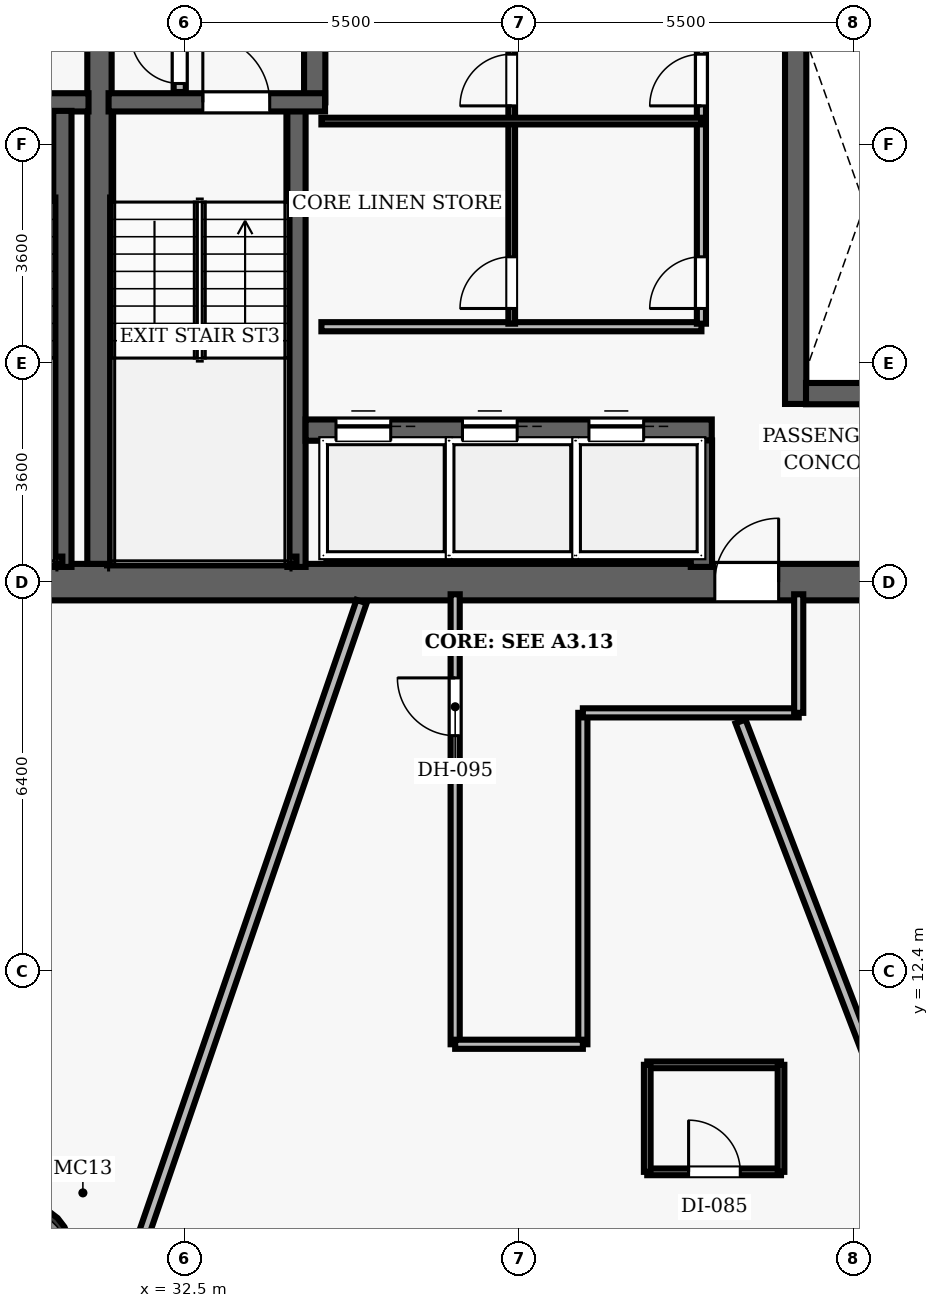
"""IFC4 building model, lengths in metres.
Left out: names, types, materials, properties, quantities, classifications, styles, units other than length and angle.
Written with IfcOpenShell. Run it as: python <this file> out.ifc"""

import sys

from ifc_helpers import new_model, si_unit, direction, frame, frame_2d, origin, origin_2d, place, context, subcontext, project, spatial, rectangle, hollow_circle, extrude, element, fill, save


model = new_model("IFC4")
c1 = context("Model", 3, precision=1e-05, world=origin(), true_north=direction((0.0, 1.0)))
c2 = subcontext(c1, "Body", "Model", "MODEL_VIEW")
j1 = project(units=[si_unit("LENGTHUNIT", "METRE"), si_unit("PLANEANGLEUNIT", "RADIAN")], contexts=[c1])
p1 = place(None, origin())
s1 = spatial("IfcSite", under=j1, at=p1, CompositionType="ELEMENT")
p2 = place(p1, origin())
s2 = spatial("IfcBuilding", under=s1, at=p2, CompositionType="ELEMENT")
p3 = place(p2, frame((0.0, 0.0, 109.8)))
s3 = spatial("IfcBuildingStorey", under=s2, at=p3, CompositionType="ELEMENT", Elevation=109.8)
p4 = place(p3, frame((26.7, 18.8, 0.0), z_axis=(0.0, 0.0, 1.0), x_axis=(1.0, 0.0, 0.0)))
e1 = element("IfcWall", 1, at=p4, inside=s3, PredefinedType="SHEAR", context=c2, shape_type="SweptSolid", body=[
    extrude(rectangle(XDim=22.6, YDim=0.6, at=frame_2d((11.3, 0.0))), origin(), (0.0, 0.0, 1.0), 3.5),
])
p5 = place(p4, frame((14.52, 0.0, 0.0)))
e2 = element("IfcOpeningElement", 2, at=p5, cuts=e1, PredefinedType="OPENING", context=c2, shape_type="SweptSolid", body=[
    extrude(rectangle(XDim=1.05, YDim=2.15, at=frame_2d((0.525, 1.075))), frame((0.0, 0.31, 0.0), z_axis=(0.0, -1.0, 0.0), x_axis=(1.0, 0.0, 0.0)), (0.0, 0.0, 1.0), 0.62),
])
p6 = place(p3, frame((31.1, 19.1, 0.0), z_axis=(0.0, 0.0, 1.0), x_axis=(0.0, 1.0, 0.0)))
e3 = element("IfcWall", 3, at=p6, inside=s3, PredefinedType="SHEAR", context=c2, shape_type="SweptSolid", body=[
    extrude(rectangle(XDim=13.8, YDim=0.4, at=frame_2d((6.9, 0.0))), origin(), (0.0, 0.0, 1.0), 3.5),
])
p7 = place(p3, frame((29.917, 7.846, 0.0), z_axis=(0.0, 0.0, 1.0), x_axis=(1.0, 0.0, 0.0)))
e4 = element("IfcColumn", 4, at=p7, inside=s3, PredefinedType="COLUMN", context=c2, shape_type="SweptSolid", body=[
    extrude(hollow_circle(Radius=0.7, WallThickness=0.055, at=origin_2d()), origin(), (0.0, 0.0, 1.0), 3.5),
])
p8 = place(p3, frame((27.25, 26.69, 0.0), z_axis=(0.0, 0.0, 1.0), x_axis=(1.0, 0.0, 0.0)))
e5 = element("IfcWall", 5, at=p8, inside=s3, PredefinedType="SHEAR", context=c2, shape_type="SweptSolid", body=[
    extrude(rectangle(XDim=3.67, YDim=0.3, at=frame_2d((1.835, 0.0))), origin(), (0.0, 0.0, 1.0), 3.5),
])
p9 = place(p8, frame((1.05, 0.0, 0.0)))
e6 = element("IfcOpeningElement", 6, at=p9, cuts=e5, PredefinedType="OPENING", context=c2, shape_type="SweptSolid", body=[
    extrude(rectangle(XDim=1.1, YDim=2.15, at=frame_2d((0.55, 1.075))), frame((0.0, 0.16, 0.0), z_axis=(0.0, -1.0, 0.0), x_axis=(1.0, 0.0, 0.0)), (0.0, 0.0, 1.0), 0.32),
])
p10 = place(p3, frame((30.49, 19.05, 0.0), z_axis=(0.0, 0.0, 1.0), x_axis=(0.0, 1.0, 0.0)))
e7 = element("IfcWall", 7, at=p10, inside=s3, PredefinedType="SHEAR", context=c2, shape_type="SweptSolid", body=[
    extrude(rectangle(XDim=7.5, YDim=0.3, at=frame_2d((3.75, 0.0))), origin(), (0.0, 0.0, 1.0), 3.5),
])
p11 = place(p3, frame((27.395, 19.16, 0.0), z_axis=(0.0, 0.0, 1.0), x_axis=(1.0, 0.0, 0.0)))
e8 = element("IfcWall", 8, at=p11, inside=s3, PredefinedType="SHEAR", context=c2, shape_type="SweptSolid", body=[
    extrude(rectangle(XDim=3.095, YDim=0.12, at=frame_2d((1.547, 0.0))), origin(), (0.0, 0.0, 1.0), 3.5),
])
p12 = place(p3, frame((34.34, 19.05, 0.0), z_axis=(0.0, 0.0, 1.0), x_axis=(0.0, 1.0, 0.0)))
e9 = element("IfcWall", 9, at=p12, inside=s3, PredefinedType="SHEAR", context=c2, shape_type="SweptSolid", body=[
    extrude(rectangle(XDim=7.5, YDim=0.3, at=frame_2d((3.75, 0.0))), origin(), (0.0, 0.0, 1.0), 3.5),
])
p13 = place(p3, frame((34.64, 26.69, 0.0), z_axis=(0.0, 0.0, 1.0), x_axis=(0.0, 1.0, 0.0)))
e10 = element("IfcWall", 10, at=p13, inside=s3, PredefinedType="SHEAR", context=c2, shape_type="SweptSolid", body=[
    extrude(rectangle(XDim=6.26, YDim=0.35, at=frame_2d((3.13, 0.0))), origin(), (0.0, 0.0, 1.0), 3.5),
])
p14 = place(p3, frame((31.25, 26.69, 0.0), z_axis=(0.0, 0.0, 1.0), x_axis=(1.0, 0.0, 0.0)))
e11 = element("IfcWall", 11, at=p14, inside=s3, PredefinedType="SHEAR", context=c2, shape_type="SweptSolid", body=[
    extrude(rectangle(XDim=3.56, YDim=0.3, at=frame_2d((1.78, 0.0))), origin(), (0.0, 0.0, 1.0), 3.5),
])
p15 = place(p14, frame((1.55, 0.0, 0.0)))
e12 = element("IfcOpeningElement", 12, at=p15, cuts=e11, PredefinedType="OPENING", context=c2, shape_type="SweptSolid", body=[
    extrude(rectangle(XDim=1.1, YDim=2.15, at=frame_2d((0.55, 1.075))), frame((0.0, 0.16, 0.0), z_axis=(0.0, -1.0, 0.0), x_axis=(1.0, 0.0, 0.0)), (0.0, 0.0, 1.0), 0.32),
])
p16 = place(p3, frame((31.3, 19.16, 0.0), z_axis=(0.0, 0.0, 1.0), x_axis=(1.0, 0.0, 0.0)))
e13 = element("IfcWall", 13, at=p16, inside=s3, PredefinedType="SHEAR", context=c2, shape_type="SweptSolid", body=[
    extrude(rectangle(XDim=3.04, YDim=0.12, at=frame_2d((1.52, 0.0))), origin(), (0.0, 0.0, 1.0), 3.5),
])
p17 = place(p3, frame((32.42, 26.86, 0.0), z_axis=(0.0, 0.0, 1.0), x_axis=(0.0, 1.0, 0.0)))
e14 = element("IfcWall", 14, at=p17, inside=s3, PredefinedType="PARTITIONING", context=c2, shape_type="SweptSolid", body=[
    extrude(rectangle(XDim=2.04, YDim=0.2, at=frame_2d((1.02, 0.0))), origin(), (0.0, 0.0, 1.0), 2.675),
])
p18 = place(p17, frame((0.14, 0.0, 0.0)))
e15 = element("IfcOpeningElement", 15, at=p18, cuts=e14, PredefinedType="OPENING", context=c2, shape_type="SweptSolid", body=[
    extrude(rectangle(XDim=0.8, YDim=2.05, at=frame_2d((0.4, 1.025))), frame((0.0, 0.11, 0.0), z_axis=(0.0, -1.0, 0.0), x_axis=(1.0, 0.0, 0.0)), (0.0, 0.0, 1.0), 0.22),
])
p19 = place(p3, frame((42.55, 21.73, 0.0), z_axis=(0.0, 0.0, 1.0), x_axis=(0.0, 1.0, 0.0)))
e16 = element("IfcWall", 16, at=p19, inside=s3, PredefinedType="SHEAR", context=c2, shape_type="SweptSolid", body=[
    extrude(rectangle(XDim=6.54, YDim=0.35, at=frame_2d((3.27, 0.0))), origin(), (0.0, 0.0, 1.0), 2.675),
])
p20 = place(p3, frame((42.72, 21.9, 0.0), z_axis=(0.0, 0.0, 1.0), x_axis=(1.0, 0.0, 0.0)))
e17 = element("IfcWall", 17, at=p20, inside=s3, PredefinedType="SHEAR", context=c2, shape_type="SweptSolid", body=[
    extrude(rectangle(XDim=2.03, YDim=0.35, at=frame_2d((1.015, 0.0))), origin(), (0.0, 0.0, 1.0), 2.675),
])
p21 = place(p3, frame((34.49, 21.3, 0.0), z_axis=(0.0, 0.0, 1.0), x_axis=(1.0, 0.0, 0.0)))
e18 = element("IfcWall", 18, at=p21, inside=s3, PredefinedType="SHEAR", context=c2, shape_type="SweptSolid", body=[
    extrude(rectangle(XDim=6.68, YDim=0.35, at=frame_2d((3.34, 0.0))), origin(), (0.0, 0.0, 1.0), 2.675),
])
p22 = place(p21, frame((0.5, 0.0, 0.0)))
e19 = element("IfcOpeningElement", 19, at=p22, cuts=e18, PredefinedType="OPENING", context=c2, shape_type="SweptSolid", body=[
    extrude(rectangle(XDim=0.9, YDim=2.15, at=frame_2d((0.45, 1.075))), frame((0.0, 0.185, 0.0), z_axis=(0.0, -1.0, 0.0), x_axis=(1.0, 0.0, 0.0)), (0.0, 0.0, 1.0), 0.37),
])
p23 = place(p21, frame((2.58, 0.0, 0.0)))
e20 = element("IfcOpeningElement", 20, at=p23, cuts=e18, PredefinedType="OPENING", context=c2, shape_type="SweptSolid", body=[
    extrude(rectangle(XDim=0.9, YDim=2.15, at=frame_2d((0.45, 1.075))), frame((0.0, 0.185, 0.0), z_axis=(0.0, -1.0, 0.0), x_axis=(1.0, 0.0, 0.0)), (0.0, 0.0, 1.0), 0.37),
])
p24 = place(p21, frame((4.66, 0.0, 0.0)))
e21 = element("IfcOpeningElement", 21, at=p24, cuts=e18, PredefinedType="OPENING", context=c2, shape_type="SweptSolid", body=[
    extrude(rectangle(XDim=0.9, YDim=2.15, at=frame_2d((0.45, 1.075))), frame((0.0, 0.185, 0.0), z_axis=(0.0, -1.0, 0.0), x_axis=(1.0, 0.0, 0.0)), (0.0, 0.0, 1.0), 0.37),
])
p25 = place(p3, frame((41.0, 19.05, 0.0), z_axis=(0.0, 0.0, 1.0), x_axis=(0.0, 1.0, 0.0)))
e22 = element("IfcWall", 22, at=p25, inside=s3, PredefinedType="SHEAR", context=c2, shape_type="SweptSolid", body=[
    extrude(rectangle(XDim=2.08, YDim=0.35, at=frame_2d((1.04, 0.0))), origin(), (0.0, 0.0, 1.0), 2.675),
])
p26 = place(p3, frame((34.75, 23.0, 0.0), z_axis=(0.0, 0.0, 1.0), x_axis=(1.0, 0.0, 0.0)))
e23 = element("IfcWall", 23, at=p26, inside=s3, PredefinedType="PARTITIONING", context=c2, shape_type="SweptSolid", body=[
    extrude(rectangle(XDim=6.25, YDim=0.15, at=frame_2d((3.125, 0.0))), origin(), (0.0, 0.0, 1.0), 2.675),
])
p27 = place(p3, frame((41.0, 23.05, 0.0), z_axis=(0.0, 0.0, 1.0), x_axis=(0.0, 1.0, 0.0)))
e24 = element("IfcWall", 24, at=p27, inside=s3, PredefinedType="PARTITIONING", context=c2, shape_type="SweptSolid", body=[
    extrude(rectangle(XDim=9.8, YDim=0.15, at=frame_2d((4.9, 0.0))), origin(), (0.0, 0.0, 1.0), 2.675),
])
p28 = place(p27, frame((0.25, 0.0, 0.0)))
e25 = element("IfcOpeningElement", 25, at=p28, cuts=e24, PredefinedType="OPENING", context=c2, shape_type="SweptSolid", body=[
    extrude(rectangle(XDim=0.85, YDim=2.1, at=frame_2d((0.425, 1.05))), frame((0.0, 0.085, 0.0), z_axis=(0.0, -1.0, 0.0), x_axis=(1.0, 0.0, 0.0)), (0.0, 0.0, 1.0), 0.17),
])
p29 = place(p27, frame((3.582, 0.0, 0.0)))
e26 = element("IfcOpeningElement", 26, at=p29, cuts=e24, PredefinedType="OPENING", context=c2, shape_type="SweptSolid", body=[
    extrude(rectangle(XDim=0.85, YDim=2.1, at=frame_2d((0.425, 1.05))), frame((0.0, 0.085, 0.0), z_axis=(0.0, -1.0, 0.0), x_axis=(1.0, 0.0, 0.0)), (0.0, 0.0, 1.0), 0.17),
])
p30 = place(p27, frame((6.816, 0.0, 0.0)))
e27 = element("IfcOpeningElement", 27, at=p30, cuts=e24, PredefinedType="OPENING", context=c2, shape_type="SweptSolid", body=[
    extrude(rectangle(XDim=0.85, YDim=2.1, at=frame_2d((0.425, 1.05))), frame((0.0, 0.085, 0.0), z_axis=(0.0, -1.0, 0.0), x_axis=(1.0, 0.0, 0.0)), (0.0, 0.0, 1.0), 0.17),
])
p31 = place(p3, frame((37.88, 23.05, 0.0), z_axis=(0.0, 0.0, 1.0), x_axis=(0.0, 1.0, 0.0)))
e28 = element("IfcWall", 28, at=p31, inside=s3, PredefinedType="PARTITIONING", context=c2, shape_type="SweptSolid", body=[
    extrude(rectangle(XDim=9.8, YDim=0.11, at=frame_2d((4.9, 0.0))), origin(), (0.0, 0.0, 1.0), 2.675),
])
p32 = place(p31, frame((0.25, 0.0, 0.0)))
e29 = element("IfcOpeningElement", 29, at=p32, cuts=e28, PredefinedType="OPENING", context=c2, shape_type="SweptSolid", body=[
    extrude(rectangle(XDim=0.85, YDim=2.1, at=frame_2d((0.425, 1.05))), frame((0.0, 0.065, 0.0), z_axis=(0.0, -1.0, 0.0), x_axis=(1.0, 0.0, 0.0)), (0.0, 0.0, 1.0), 0.13),
])
p33 = place(p31, frame((3.582, 0.0, 0.0)))
e30 = element("IfcOpeningElement", 30, at=p33, cuts=e28, PredefinedType="OPENING", context=c2, shape_type="SweptSolid", body=[
    extrude(rectangle(XDim=0.85, YDim=2.1, at=frame_2d((0.425, 1.05))), frame((0.0, 0.065, 0.0), z_axis=(0.0, -1.0, 0.0), x_axis=(1.0, 0.0, 0.0)), (0.0, 0.0, 1.0), 0.13),
])
p34 = place(p31, frame((6.816, 0.0, 0.0)))
e31 = element("IfcOpeningElement", 31, at=p34, cuts=e28, PredefinedType="OPENING", context=c2, shape_type="SweptSolid", body=[
    extrude(rectangle(XDim=0.85, YDim=2.1, at=frame_2d((0.425, 1.05))), frame((0.0, 0.065, 0.0), z_axis=(0.0, -1.0, 0.0), x_axis=(1.0, 0.0, 0.0)), (0.0, 0.0, 1.0), 0.13),
])
p35 = place(p3, frame((34.75, 26.382, 0.0), z_axis=(0.0, 0.0, 1.0), x_axis=(1.0, 0.0, 0.0)))
e32 = element("IfcWall", 32, at=p35, inside=s3, PredefinedType="PARTITIONING", context=c2, shape_type="SweptSolid", body=[
    extrude(rectangle(XDim=6.25, YDim=0.11, at=frame_2d((3.125, 0.0))), origin(), (0.0, 0.0, 1.0), 2.675),
])
p36 = place(p3, frame((36.95, 11.2, 0.0), z_axis=(0.0, 0.0, 1.0), x_axis=(0.0, 1.0, 0.0)))
e33 = element("IfcWall", 33, at=p36, inside=s3, PredefinedType="PARTITIONING", context=c2, shape_type="SweptSolid", body=[
    extrude(rectangle(XDim=7.4, YDim=0.15, at=frame_2d((3.7, 0.0))), origin(), (0.0, 0.0, 1.0), 2.675),
])
p37 = place(p36, frame((5.075, 0.0, 0.0)))
e34 = element("IfcOpeningElement", 34, at=p37, cuts=e33, PredefinedType="OPENING", context=c2, shape_type="SweptSolid", body=[
    extrude(rectangle(XDim=0.95, YDim=2.15, at=frame_2d((0.475, 1.075))), frame((0.0, 0.085, 0.0), z_axis=(0.0, -1.0, 0.0), x_axis=(1.0, 0.0, 0.0)), (0.0, 0.0, 1.0), 0.17),
])
p38 = place(p3, frame((39.05, 11.2, 0.0), z_axis=(0.0, 0.0, 1.0), x_axis=(0.0, 1.0, 0.0)))
e35 = element("IfcWall", 35, at=p38, inside=s3, PredefinedType="PARTITIONING", context=c2, shape_type="SweptSolid", body=[
    extrude(rectangle(XDim=5.45, YDim=0.15, at=frame_2d((2.725, 0.0))), origin(), (0.0, 0.0, 1.0), 2.675),
])
p39 = place(p3, frame((39.05, 16.65, 0.0), z_axis=(0.0, 0.0, 1.0), x_axis=(1.0, 0.0, 0.0)))
e36 = element("IfcWall", 36, at=p39, inside=s3, PredefinedType="PARTITIONING", context=c2, shape_type="SweptSolid", body=[
    extrude(rectangle(XDim=3.55, YDim=0.15, at=frame_2d((1.775, 0.0))), origin(), (0.0, 0.0, 1.0), 2.675),
])
p40 = place(p3, frame((42.6, 16.65, 0.0), z_axis=(0.0, 0.0, 1.0), x_axis=(0.0, 1.0, 0.0)))
e37 = element("IfcWall", 37, at=p40, inside=s3, PredefinedType="PARTITIONING", context=c2, shape_type="SweptSolid", body=[
    extrude(rectangle(XDim=1.95, YDim=0.15, at=frame_2d((0.975, 0.0))), origin(), (0.0, 0.0, 1.0), 2.675),
])
p41 = place(p3, frame((36.95, 11.2, 0.0), z_axis=(0.0, 0.0, 1.0), x_axis=(1.0, 0.0, 0.0)))
e38 = element("IfcWall", 38, at=p41, inside=s3, PredefinedType="PARTITIONING", context=c2, shape_type="SweptSolid", body=[
    extrude(rectangle(XDim=2.1, YDim=0.15, at=frame_2d((1.05, 0.0))), origin(), (0.0, 0.0, 1.0), 2.675),
])
p42 = place(p3, frame((35.411, 18.48, 0.0), z_axis=(0.0, 0.0, 1.0), x_axis=(-0.32557542386, -0.945516072512, 0.0)))
e39 = element("IfcWall", 39, at=p42, inside=s3, PredefinedType="PARTITIONING", context=c2, shape_type="SweptSolid", body=[
    extrude(rectangle(XDim=15.003, YDim=0.175, at=frame_2d((7.502, 0.0))), origin(), (0.0, 0.0, 1.0), 2.675),
])
p43 = place(p3, frame((41.643, 16.51, 0.0), z_axis=(0.0, 0.0, 1.0), x_axis=(0.358366750577, -0.933580886737, 0.0)))
e40 = element("IfcWall", 40, at=p43, inside=s3, PredefinedType="PARTITIONING", context=c2, shape_type="SweptSolid", body=[
    extrude(rectangle(XDim=13.548, YDim=0.175, at=frame_2d((6.774, 0.0))), origin(), (0.0, 0.0, 1.0), 2.675),
])
p44 = place(p3, frame((40.109, 9.102, 0.0), z_axis=(0.0, 0.0, 1.0), x_axis=(1.0, 0.0, 0.0)))
e41 = element("IfcWall", 41, at=p44, inside=s3, PredefinedType="PARTITIONING", context=c2, shape_type="SweptSolid", body=[
    extrude(rectangle(XDim=2.2, YDim=0.11, at=frame_2d((1.1, 0.0))), origin(), (0.0, 0.0, 1.0), 2.675),
])
p45 = place(p44, frame((0.68, 0.0, 0.0)))
e42 = element("IfcOpeningElement", 42, at=p45, cuts=e41, PredefinedType="OPENING", context=c2, shape_type="SweptSolid", body=[
    extrude(rectangle(XDim=0.85, YDim=2.1, at=frame_2d((0.425, 1.05))), frame((0.0, 0.065, 0.0), z_axis=(0.0, -1.0, 0.0), x_axis=(1.0, 0.0, 0.0)), (0.0, 0.0, 1.0), 0.13),
])
p46 = place(p3, frame((40.109, 10.862, 0.0), z_axis=(0.0, 0.0, 1.0), x_axis=(1.0, 0.0, 0.0)))
e43 = element("IfcWall", 43, at=p46, inside=s3, PredefinedType="PARTITIONING", context=c2, shape_type="SweptSolid", body=[
    extrude(rectangle(XDim=2.2, YDim=0.11, at=frame_2d((1.1, 0.0))), origin(), (0.0, 0.0, 1.0), 2.675),
])
for number, where, z_axis, x_axis in (
    (44, (40.109, 9.102, 0.0), (0.0, 0.0, 1.0), (0.0, 1.0, 0.0)),
    (45, (42.309, 9.102, 0.0), (0.0, 0.0, 1.0), (0.0, 1.0, 0.0)),
):
    element("IfcWall", number, at=place(p3, frame(where, z_axis=z_axis, x_axis=x_axis)), inside=s3, PredefinedType="PARTITIONING", context=c2, shape_type="SweptSolid", body=[
        extrude(rectangle(XDim=1.76, YDim=0.11, at=frame_2d((0.88, 0.0))), origin(), (0.0, 0.0, 1.0), 2.675),
    ])
p47 = place(p15, origin())
e46 = element("IfcDoor", 46, at=p47, inside=s3, OperationType="SINGLE_SWING_LEFT", PredefinedType="DOOR", context=c2, shape_type="SweptSolid", body=[
    extrude(rectangle(XDim=1.1, YDim=2.15, at=frame_2d((0.55, 1.075))), frame((0.0, 0.025, 0.0), z_axis=(0.0, -1.0, 0.0), x_axis=(1.0, 0.0, 0.0)), (0.0, 0.0, 1.0), 0.05),
])
fill(e12, e46)
p48 = place(p18, origin())
e47 = element("IfcDoor", 47, at=p48, inside=s3, OperationType="SINGLE_SWING_RIGHT", PredefinedType="DOOR", context=c2, shape_type="SweptSolid", body=[
    extrude(rectangle(XDim=0.8, YDim=2.05, at=frame_2d((0.4, 1.025))), frame((0.0, 0.025, 0.0), z_axis=(0.0, -1.0, 0.0), x_axis=(1.0, 0.0, 0.0)), (0.0, 0.0, 1.0), 0.05),
])
fill(e15, e47)
p49 = place(p5, origin())
e48 = element("IfcDoor", 48, at=p49, inside=s3, OperationType="SINGLE_SWING_RIGHT", PredefinedType="DOOR", context=c2, shape_type="SweptSolid", body=[
    extrude(rectangle(XDim=1.05, YDim=2.15, at=frame_2d((0.525, 1.075))), frame((0.0, 0.025, 0.0), z_axis=(0.0, -1.0, 0.0), x_axis=(1.0, 0.0, 0.0)), (0.0, 0.0, 1.0), 0.05),
])
fill(e2, e48)
p50 = place(p28, origin())
e49 = element("IfcDoor", 49, at=p50, inside=s3, OperationType="SINGLE_SWING_LEFT", PredefinedType="DOOR", context=c2, shape_type="SweptSolid", body=[
    extrude(rectangle(XDim=0.85, YDim=2.1, at=frame_2d((0.425, 1.05))), frame((0.0, 0.025, 0.0), z_axis=(0.0, -1.0, 0.0), x_axis=(1.0, 0.0, 0.0)), (0.0, 0.0, 1.0), 0.05),
])
fill(e25, e49)
p51 = place(p32, origin())
e50 = element("IfcDoor", 50, at=p51, inside=s3, OperationType="SINGLE_SWING_LEFT", PredefinedType="DOOR", context=c2, shape_type="SweptSolid", body=[
    extrude(rectangle(XDim=0.85, YDim=2.1, at=frame_2d((0.425, 1.05))), frame((0.0, 0.025, 0.0), z_axis=(0.0, -1.0, 0.0), x_axis=(1.0, 0.0, 0.0)), (0.0, 0.0, 1.0), 0.05),
])
fill(e29, e50)
p52 = place(p29, origin())
e51 = element("IfcDoor", 51, at=p52, inside=s3, OperationType="SINGLE_SWING_LEFT", PredefinedType="DOOR", context=c2, shape_type="SweptSolid", body=[
    extrude(rectangle(XDim=0.85, YDim=2.1, at=frame_2d((0.425, 1.05))), frame((0.0, 0.025, 0.0), z_axis=(0.0, -1.0, 0.0), x_axis=(1.0, 0.0, 0.0)), (0.0, 0.0, 1.0), 0.05),
])
fill(e26, e51)
p53 = place(p33, origin())
e52 = element("IfcDoor", 52, at=p53, inside=s3, OperationType="SINGLE_SWING_LEFT", PredefinedType="DOOR", context=c2, shape_type="SweptSolid", body=[
    extrude(rectangle(XDim=0.85, YDim=2.1, at=frame_2d((0.425, 1.05))), frame((0.0, 0.025, 0.0), z_axis=(0.0, -1.0, 0.0), x_axis=(1.0, 0.0, 0.0)), (0.0, 0.0, 1.0), 0.05),
])
fill(e30, e52)
p54 = place(p37, origin())
e53 = element("IfcDoor", 53, at=p54, inside=s3, OperationType="SINGLE_SWING_RIGHT", PredefinedType="DOOR", context=c2, shape_type="SweptSolid", body=[
    extrude(rectangle(XDim=0.95, YDim=2.15, at=frame_2d((0.475, 1.075))), frame((0.0, 0.025, 0.0), z_axis=(0.0, -1.0, 0.0), x_axis=(1.0, 0.0, 0.0)), (0.0, 0.0, 1.0), 0.05),
])
fill(e34, e53)
p55 = place(p45, origin())
e54 = element("IfcDoor", 54, at=p55, inside=s3, OperationType="SINGLE_SWING_LEFT", PredefinedType="DOOR", context=c2, shape_type="SweptSolid", body=[
    extrude(rectangle(XDim=0.85, YDim=2.1, at=frame_2d((0.425, 1.05))), frame((0.0, 0.025, 0.0), z_axis=(0.0, -1.0, 0.0), x_axis=(1.0, 0.0, 0.0)), (0.0, 0.0, 1.0), 0.05),
])
fill(e42, e54)
p56 = place(p22, origin())
e55 = element("IfcDoor", 55, at=p56, inside=s3, OperationType="SLIDING_TO_LEFT", PredefinedType="DOOR", context=c2, shape_type="SweptSolid", body=[
    extrude(rectangle(XDim=0.9, YDim=2.15, at=frame_2d((0.45, 1.075))), frame((0.0, 0.025, 0.0), z_axis=(0.0, -1.0, 0.0), x_axis=(1.0, 0.0, 0.0)), (0.0, 0.0, 1.0), 0.05),
])
fill(e19, e55)
p57 = place(p23, origin())
e56 = element("IfcDoor", 56, at=p57, inside=s3, OperationType="SLIDING_TO_LEFT", PredefinedType="DOOR", context=c2, shape_type="SweptSolid", body=[
    extrude(rectangle(XDim=0.9, YDim=2.15, at=frame_2d((0.45, 1.075))), frame((0.0, 0.025, 0.0), z_axis=(0.0, -1.0, 0.0), x_axis=(1.0, 0.0, 0.0)), (0.0, 0.0, 1.0), 0.05),
])
fill(e20, e56)
p58 = place(p24, origin())
e57 = element("IfcDoor", 57, at=p58, inside=s3, OperationType="SLIDING_TO_LEFT", PredefinedType="DOOR", context=c2, shape_type="SweptSolid", body=[
    extrude(rectangle(XDim=0.9, YDim=2.15, at=frame_2d((0.45, 1.075))), frame((0.0, 0.025, 0.0), z_axis=(0.0, -1.0, 0.0), x_axis=(1.0, 0.0, 0.0)), (0.0, 0.0, 1.0), 0.05),
])
fill(e21, e57)
save(model, sys.argv[1])
